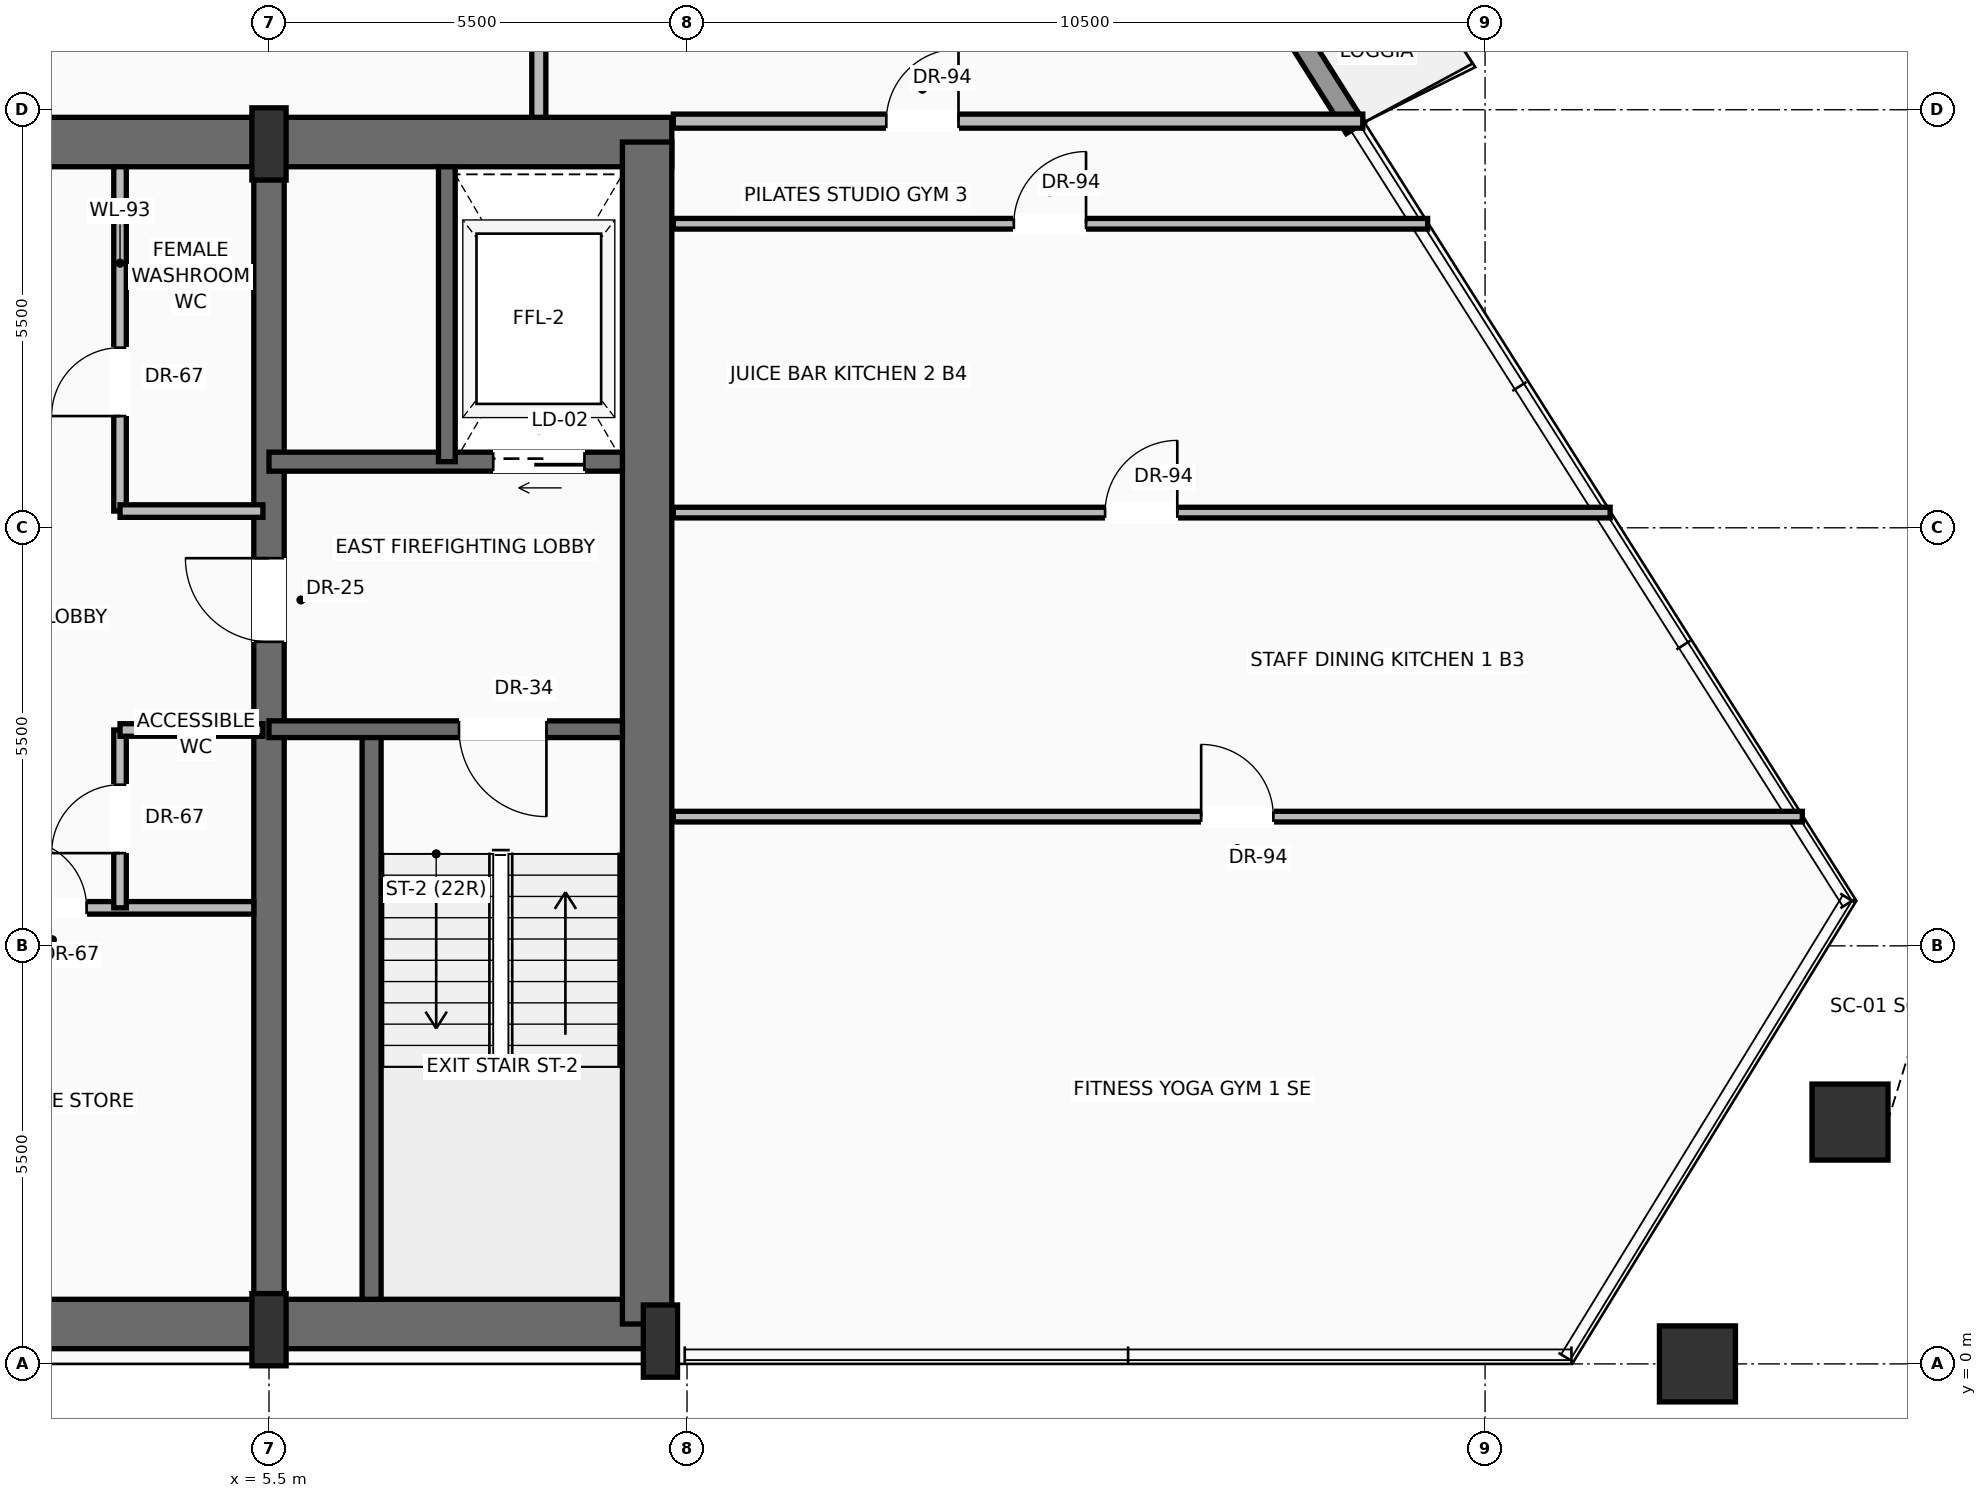
"""IFC4 building model, lengths in metres.
Left out: names, types, materials, properties, quantities, classifications, styles, units other than length and angle.
Written with IfcOpenShell. Run it as: python <this file> out.ifc"""

import sys

from ifc_helpers import new_model, si_unit, direction, frame, frame_2d, origin, origin_2d, place, context, subcontext, project, spatial, rectangle, hollow_rectangle, extrude, source, transform, mapped, element, fill, save


model = new_model("IFC4")
c1 = context("Model", 3, precision=1e-05, world=origin(), true_north=direction((0.0, 1.0)))
c2 = subcontext(c1, "Body", "Model", "MODEL_VIEW")
j1 = project(units=[si_unit("LENGTHUNIT", "METRE"), si_unit("PLANEANGLEUNIT", "RADIAN")], contexts=[c1])
p1 = place(None, origin())
s1 = spatial("IfcSite", under=j1, at=p1, CompositionType="ELEMENT")
p2 = place(p1, origin())
s2 = spatial("IfcBuilding", under=s1, at=p2, CompositionType="ELEMENT")
p3 = place(p2, frame((0.0, 0.0, 196.9)))
s3 = spatial("IfcBuildingStorey", under=s2, at=p3, CompositionType="ELEMENT", Elevation=196.9)
p4 = place(p3, frame((-10.65, 0.525, 0.0), z_axis=(0.0, 0.0, 1.0), x_axis=(1.0, 0.0, 0.0)))
e1 = element("IfcWall", 1, at=p4, inside=s3, PredefinedType="SHEAR", context=c2, shape_type="SweptSolid", body=[
    extrude(rectangle(XDim=21.3, YDim=0.65, at=frame_2d((10.65, 0.0))), origin(), (0.0, 0.0, 1.0), 3.47),
])
p5 = place(p3, frame((-10.8, 16.075, 0.0), z_axis=(0.0, 0.0, 1.0), x_axis=(1.0, 0.0, 0.0)))
e2 = element("IfcWall", 2, at=p5, inside=s3, PredefinedType="SHEAR", context=c2, shape_type="SweptSolid", body=[
    extrude(rectangle(XDim=21.6, YDim=0.65, at=frame_2d((10.8, 0.0))), origin(), (0.0, 0.0, 1.0), 3.47),
])
p6 = place(p5, frame((3.37, 0.0, 0.0)))
e3 = element("IfcOpeningElement", 3, at=p6, cuts=e2, PredefinedType="OPENING", context=c2, shape_type="SweptSolid", body=[
    extrude(rectangle(XDim=1.3, YDim=2.3, at=frame_2d((0.65, 1.15))), frame((0.0, 0.335, 0.0), z_axis=(0.0, -1.0, 0.0), x_axis=(1.0, 0.0, 0.0)), (0.0, 0.0, 1.0), 0.67),
])
p7 = place(p5, frame((9.8, 0.0, 0.0)))
e4 = element("IfcOpeningElement", 4, at=p7, cuts=e2, PredefinedType="OPENING", context=c2, shape_type="SweptSolid", body=[
    extrude(rectangle(XDim=2.0, YDim=2.4, at=frame_2d((1.0, 1.2))), frame((0.0, 0.335, 0.0), z_axis=(0.0, -1.0, 0.0), x_axis=(1.0, 0.0, 0.0)), (0.0, 0.0, 1.0), 0.67),
])
p8 = place(p3, frame((10.475, 0.525, 0.0), z_axis=(0.0, 0.0, 1.0), x_axis=(0.0, 1.0, 0.0)))
e5 = element("IfcWall", 5, at=p8, inside=s3, PredefinedType="SHEAR", context=c2, shape_type="SweptSolid", body=[
    extrude(rectangle(XDim=15.55, YDim=0.65, at=frame_2d((7.775, 0.0))), origin(), (0.0, 0.0, 1.0), 3.47),
])
p9 = place(p3, frame((5.5, 0.525, 0.0), z_axis=(0.0, 0.0, 1.0), x_axis=(0.0, 1.0, 0.0)))
e6 = element("IfcWall", 6, at=p9, inside=s3, PredefinedType="SHEAR", context=c2, shape_type="SweptSolid", body=[
    extrude(rectangle(XDim=15.55, YDim=0.4, at=frame_2d((7.775, 0.0))), origin(), (0.0, 0.0, 1.0), 3.47),
])
p10 = place(p9, frame((8.975, 0.0, 0.0)))
e7 = element("IfcOpeningElement", 7, at=p10, cuts=e6, PredefinedType="OPENING", context=c2, shape_type="SweptSolid", body=[
    extrude(rectangle(XDim=1.1, YDim=2.2, at=frame_2d((0.55, 1.1))), frame((0.0, 0.21, 0.0), z_axis=(0.0, -1.0, 0.0), x_axis=(1.0, 0.0, 0.0)), (0.0, 0.0, 1.0), 0.42),
])
m1 = source(origin(), c2, "Body", "SweptSolid", [
    extrude(rectangle(XDim=0.45, YDim=0.95, at=origin_2d()), origin(), (0.0, 0.0, 1.0), 3.7),
])
for number, where, z_axis, x_axis in (
    (8, (5.5, 0.45, 0.0), (0.0, 0.0, 1.0), (1.0, 0.0, 0.0)),
    (9, (10.65, 0.3, 0.0), (0.0, 0.0, 1.0), (1.0, 0.0, 0.0)),
    (10, (5.5, 16.05, 0.0), (0.0, 0.0, 1.0), (1.0, 0.0, 0.0)),
):
    element("IfcColumn", number, at=place(p3, frame(where, z_axis=z_axis, x_axis=x_axis)), inside=s3, PredefinedType="PILASTER", context=c2, shape_type="MappedRepresentation", body=[
        mapped(m1, transform((0.0, 0.0, 0.0), scale=1.0)),
    ])
m2 = source(origin(), c2, "Body", "SweptSolid", [
    extrude(hollow_rectangle(XDim=1.0, YDim=1.0, WallThickness=0.05, at=origin_2d()), origin(), (0.0, 0.0, 1.0), 3.691),
])
p11 = place(p3, frame((24.294, 0.0, 0.004), z_axis=(0.004563444546, 0.0, 0.999989587433), x_axis=(0.0, 1.0, 0.0)))
e11 = element("IfcColumn", 11, at=p11, inside=s3, PredefinedType="COLUMN", context=c2, shape_type="MappedRepresentation", body=[
    mapped(m2, transform((0.0, 0.0, 0.0), scale=1.0)),
])
m3 = source(origin(), c2, "Body", "SweptSolid", [
    extrude(hollow_rectangle(XDim=1.0, YDim=1.0, WallThickness=0.05, at=origin_2d()), origin(), (0.0, 0.0, 1.0), 3.692),
])
p12 = place(p3, frame((26.302, 3.181, 0.004), z_axis=(-0.006414539113, -0.014482309955, 0.999874550324), x_axis=(0.914327305822, -0.4049760213, 0.0)))
e12 = element("IfcColumn", 12, at=p12, inside=s3, PredefinedType="COLUMN", context=c2, shape_type="MappedRepresentation", body=[
    mapped(m3, transform((0.0, 0.0, 0.0), scale=1.0)),
])
p13 = place(p3, frame((9.62, 32.358, 0.0), z_axis=(0.0, 0.0, 1.0), x_axis=(0.534252973029, -0.845324648174, 0.0)))
e13 = element("IfcWall", 13, at=p13, inside=s3, PredefinedType="SOLIDWALL", context=c2, shape_type="SweptSolid", body=[
    extrude(rectangle(XDim=19.042, YDim=0.28, at=frame_2d((9.521, 0.0))), origin(), (0.0, 0.0, 1.0), 3.05),
])
p14 = place(p13, frame((4.57, 0.0, 0.0)))
e14 = element("IfcOpeningElement", 14, at=p14, cuts=e13, PredefinedType="OPENING", context=c2, shape_type="SweptSolid", body=[
    extrude(rectangle(XDim=1.6, YDim=2.35, at=frame_2d((0.8, 1.175))), frame((0.0, 0.15, 0.0), z_axis=(0.0, -1.0, 0.0), x_axis=(1.0, 0.0, 0.0)), (0.0, 0.0, 1.0), 0.3),
])
p15 = place(p13, frame((12.948, 0.0, 0.9)))
e15 = element("IfcOpeningElement", 15, at=p15, cuts=e13, PredefinedType="OPENING", context=c2, shape_type="SweptSolid", body=[
    extrude(rectangle(XDim=2.0, YDim=1.85, at=frame_2d((1.0, 0.925))), frame((0.0, 0.15, 0.0), z_axis=(0.0, -1.0, 0.0), x_axis=(1.0, 0.0, 0.0)), (0.0, 0.0, 1.0), 0.3),
])
p16 = place(p3, frame((6.85, 0.85, 0.0), z_axis=(0.0, 0.0, 1.0), x_axis=(0.0, 1.0, 0.0)))
e16 = element("IfcWall", 16, at=p16, inside=s3, PredefinedType="SOLIDWALL", context=c2, shape_type="SweptSolid", body=[
    extrude(rectangle(XDim=7.5, YDim=0.25, at=frame_2d((3.75, 0.0))), origin(), (0.0, 0.0, 1.0), 3.47),
])
p17 = place(p3, frame((10.15, 8.35, 0.0), z_axis=(0.0, 0.0, 1.0), x_axis=(-1.0, 0.0, 0.0)))
e17 = element("IfcWall", 17, at=p17, inside=s3, PredefinedType="SOLIDWALL", context=c2, shape_type="SweptSolid", body=[
    extrude(rectangle(XDim=4.65, YDim=0.22, at=frame_2d((2.325, 0.0))), origin(), (0.0, 0.0, 1.0), 3.47),
])
p18 = place(p17, frame((1.0, 0.0, 0.0)))
e18 = element("IfcOpeningElement", 18, at=p18, cuts=e17, PredefinedType="OPENING", context=c2, shape_type="SweptSolid", body=[
    extrude(rectangle(XDim=1.15, YDim=2.2, at=frame_2d((0.575, 1.1))), frame((0.0, 0.12, 0.0), z_axis=(0.0, -1.0, 0.0), x_axis=(1.0, 0.0, 0.0)), (0.0, 0.0, 1.0), 0.24),
])
p19 = place(p3, frame((10.15, 11.87, 0.0), z_axis=(0.0, 0.0, 1.0), x_axis=(-1.0, 0.0, 0.0)))
e19 = element("IfcWall", 19, at=p19, inside=s3, PredefinedType="SOLIDWALL", context=c2, shape_type="SweptSolid", body=[
    extrude(rectangle(XDim=4.65, YDim=0.25, at=frame_2d((2.325, 0.0))), origin(), (0.0, 0.0, 1.0), 3.47),
])
p20 = place(p19, frame((0.5, 0.0, 0.0)))
e20 = element("IfcOpeningElement", 20, at=p20, cuts=e19, PredefinedType="OPENING", context=c2, shape_type="SweptSolid", body=[
    extrude(rectangle(XDim=1.2, YDim=2.25, at=frame_2d((0.6, 1.125))), frame((0.0, 0.135, 0.0), z_axis=(0.0, -1.0, 0.0), x_axis=(1.0, 0.0, 0.0)), (0.0, 0.0, 1.0), 0.27),
])
p21 = place(p3, frame((7.84, 11.87, 0.0), z_axis=(0.0, 0.0, 1.0), x_axis=(0.0, 1.0, 0.0)))
e21 = element("IfcWall", 21, at=p21, inside=s3, PredefinedType="SOLIDWALL", context=c2, shape_type="SweptSolid", body=[
    extrude(rectangle(XDim=3.88, YDim=0.22, at=frame_2d((1.94, 0.0))), origin(), (0.0, 0.0, 1.0), 3.47),
])
p22 = place(p3, frame((1.82, 6.0, 0.0), z_axis=(0.0, 0.0, 1.0), x_axis=(1.0, 0.0, 0.0)))
e22 = element("IfcWall", 22, at=p22, inside=s3, PredefinedType="PARTITIONING", context=c2, shape_type="SweptSolid", body=[
    extrude(rectangle(XDim=3.48, YDim=0.165, at=frame_2d((1.74, 0.0))), origin(), (0.0, 0.0, 1.0), 3.462),
])
p23 = place(p22, frame((0.38, 0.0, 0.0)))
e23 = element("IfcOpeningElement", 23, at=p23, cuts=e22, PredefinedType="OPENING", context=c2, shape_type="SweptSolid", body=[
    extrude(rectangle(XDim=0.9, YDim=2.1, at=frame_2d((0.45, 1.05))), frame((0.0, 0.093, 0.0), z_axis=(0.0, -1.0, 0.0), x_axis=(1.0, 0.0, 0.0)), (0.0, 0.0, 1.0), 0.185),
])
p24 = place(p3, frame((3.54, 6.0, 0.0), z_axis=(0.0, 0.0, 1.0), x_axis=(0.0, 1.0, 0.0)))
e24 = element("IfcWall", 24, at=p24, inside=s3, PredefinedType="PARTITIONING", context=c2, shape_type="SweptSolid", body=[
    extrude(rectangle(XDim=2.34, YDim=0.165, at=frame_2d((1.17, 0.0))), origin(), (0.0, 0.0, 1.0), 3.462),
])
p25 = place(p24, frame((0.72, 0.0, 0.0)))
e25 = element("IfcOpeningElement", 25, at=p25, cuts=e24, PredefinedType="OPENING", context=c2, shape_type="SweptSolid", body=[
    extrude(rectangle(XDim=0.9, YDim=2.1, at=frame_2d((0.45, 1.05))), frame((0.0, 0.093, 0.0), z_axis=(0.0, -1.0, 0.0), x_axis=(1.0, 0.0, 0.0)), (0.0, 0.0, 1.0), 0.185),
])
p26 = place(p3, frame((3.54, 8.34, 0.0), z_axis=(0.0, 0.0, 1.0), x_axis=(1.0, 0.0, 0.0)))
e26 = element("IfcWall", 26, at=p26, inside=s3, PredefinedType="PARTITIONING", context=c2, shape_type="SweptSolid", body=[
    extrude(rectangle(XDim=1.88, YDim=0.165, at=frame_2d((0.94, 0.0))), origin(), (0.0, 0.0, 1.0), 3.462),
])
p27 = place(p3, frame((3.54, 11.22, 0.0), z_axis=(0.0, 0.0, 1.0), x_axis=(0.0, 1.0, 0.0)))
e27 = element("IfcWall", 27, at=p27, inside=s3, PredefinedType="PARTITIONING", context=c2, shape_type="SweptSolid", body=[
    extrude(rectangle(XDim=4.53, YDim=0.165, at=frame_2d((2.265, 0.0))), origin(), (0.0, 0.0, 1.0), 3.462),
])
p28 = place(p27, frame((1.25, 0.0, 0.0)))
e28 = element("IfcOpeningElement", 28, at=p28, cuts=e27, PredefinedType="OPENING", context=c2, shape_type="SweptSolid", body=[
    extrude(rectangle(XDim=0.9, YDim=2.1, at=frame_2d((0.45, 1.05))), frame((0.0, 0.093, 0.0), z_axis=(0.0, -1.0, 0.0), x_axis=(1.0, 0.0, 0.0)), (0.0, 0.0, 1.0), 0.185),
])
p29 = place(p3, frame((3.54, 11.22, 0.0), z_axis=(0.0, 0.0, 1.0), x_axis=(1.0, 0.0, 0.0)))
e29 = element("IfcWall", 29, at=p29, inside=s3, PredefinedType="PARTITIONING", context=c2, shape_type="SweptSolid", body=[
    extrude(rectangle(XDim=1.88, YDim=0.165, at=frame_2d((0.94, 0.0))), origin(), (0.0, 0.0, 1.0), 3.462),
])
p30 = place(p3, frame((9.05, 16.4, 0.0), z_axis=(0.0, 0.0, 1.0), x_axis=(0.0, 1.0, 0.0)))
e30 = element("IfcWall", 30, at=p30, inside=s3, PredefinedType="PARTITIONING", context=c2, shape_type="SweptSolid", body=[
    extrude(rectangle(XDim=5.8, YDim=0.185, at=frame_2d((2.9, 0.0))), origin(), (0.0, 0.0, 1.0), 3.462),
])
p31 = place(p30, frame((1.943, 0.0, 0.0)))
e31 = element("IfcOpeningElement", 31, at=p31, cuts=e30, PredefinedType="OPENING", context=c2, shape_type="SweptSolid", body=[
    extrude(rectangle(XDim=0.95, YDim=2.2, at=frame_2d((0.475, 1.1))), frame((0.0, 0.103, 0.0), z_axis=(0.0, -1.0, 0.0), x_axis=(1.0, 0.0, 0.0)), (0.0, 0.0, 1.0), 0.205),
])
p32 = place(p3, frame((10.82, 16.35, 0.0), z_axis=(0.0, 0.0, 1.0), x_axis=(1.0, 0.0, 0.0)))
e32 = element("IfcWall", 32, at=p32, inside=s3, PredefinedType="PARTITIONING", context=c2, shape_type="SweptSolid", body=[
    extrude(rectangle(XDim=9.071, YDim=0.185, at=frame_2d((4.536, 0.0))), origin(), (0.0, 0.0, 1.0), 3.462),
])
p33 = place(p32, frame((2.802, 0.0, 0.0)))
e33 = element("IfcOpeningElement", 33, at=p33, cuts=e32, PredefinedType="OPENING", context=c2, shape_type="SweptSolid", body=[
    extrude(rectangle(XDim=0.95, YDim=2.2, at=frame_2d((0.475, 1.1))), frame((0.0, 0.103, 0.0), z_axis=(0.0, -1.0, 0.0), x_axis=(1.0, 0.0, 0.0)), (0.0, 0.0, 1.0), 0.205),
])
p34 = place(p3, frame((10.82, 7.2, 0.0), z_axis=(0.0, 0.0, 1.0), x_axis=(1.0, 0.0, 0.0)))
e34 = element("IfcWall", 34, at=p34, inside=s3, PredefinedType="PARTITIONING", context=c2, shape_type="SweptSolid", body=[
    extrude(rectangle(XDim=14.854, YDim=0.14, at=frame_2d((7.427, 0.0))), origin(), (0.0, 0.0, 1.0), 3.049),
])
p35 = place(p34, frame((6.945, 0.0, 0.0)))
e35 = element("IfcOpeningElement", 35, at=p35, cuts=e34, PredefinedType="OPENING", context=c2, shape_type="SweptSolid", body=[
    extrude(rectangle(XDim=0.95, YDim=2.2, at=frame_2d((0.475, 1.1))), frame((0.0, 0.08, 0.0), z_axis=(0.0, -1.0, 0.0), x_axis=(1.0, 0.0, 0.0)), (0.0, 0.0, 1.0), 0.16),
])
p36 = place(p3, frame((10.82, 11.2, 0.0), z_axis=(0.0, 0.0, 1.0), x_axis=(1.0, 0.0, 0.0)))
e36 = element("IfcWall", 36, at=p36, inside=s3, PredefinedType="PARTITIONING", context=c2, shape_type="SweptSolid", body=[
    extrude(rectangle(XDim=12.326, YDim=0.14, at=frame_2d((6.163, 0.0))), origin(), (0.0, 0.0, 1.0), 3.462),
])
p37 = place(p36, frame((5.681, 0.0, 0.0)))
e37 = element("IfcOpeningElement", 37, at=p37, cuts=e36, PredefinedType="OPENING", context=c2, shape_type="SweptSolid", body=[
    extrude(rectangle(XDim=0.95, YDim=2.2, at=frame_2d((0.475, 1.1))), frame((0.0, 0.08, 0.0), z_axis=(0.0, -1.0, 0.0), x_axis=(1.0, 0.0, 0.0)), (0.0, 0.0, 1.0), 0.16),
])
p38 = place(p3, frame((10.82, 15.0, 0.0), z_axis=(0.0, 0.0, 1.0), x_axis=(1.0, 0.0, 0.0)))
e38 = element("IfcWall", 38, at=p38, inside=s3, PredefinedType="PARTITIONING", context=c2, shape_type="SweptSolid", body=[
    extrude(rectangle(XDim=9.924, YDim=0.14, at=frame_2d((4.962, 0.0))), origin(), (0.0, 0.0, 1.0), 3.462),
])
p39 = place(p38, frame((4.48, 0.0, 0.0)))
e39 = element("IfcOpeningElement", 39, at=p39, cuts=e38, PredefinedType="OPENING", context=c2, shape_type="SweptSolid", body=[
    extrude(rectangle(XDim=0.95, YDim=2.2, at=frame_2d((0.475, 1.1))), frame((0.0, 0.08, 0.0), z_axis=(0.0, -1.0, 0.0), x_axis=(1.0, 0.0, 0.0)), (0.0, 0.0, 1.0), 0.16),
])
m4 = source(origin(), c2, "Body", "SweptSolid", [
    extrude(rectangle(XDim=1.15, YDim=2.2, at=frame_2d((0.575, 1.1))), frame((0.0, 0.025, 0.0), z_axis=(0.0, -1.0, 0.0), x_axis=(1.0, 0.0, 0.0)), (0.0, 0.0, 1.0), 0.05),
])
p40 = place(p18, origin())
e40 = element("IfcDoor", 40, at=p40, inside=s3, OperationType="SINGLE_SWING_LEFT", PredefinedType="DOOR", context=c2, shape_type="MappedRepresentation", body=[
    mapped(m4, transform((0.0, 0.0, 0.0), scale=1.0)),
])
fill(e18, e40)
m5 = source(origin(), c2, "Body", "SweptSolid", [
    extrude(rectangle(XDim=1.1, YDim=2.2, at=frame_2d((0.55, 1.1))), frame((0.0, 0.025, 0.0), z_axis=(0.0, -1.0, 0.0), x_axis=(1.0, 0.0, 0.0)), (0.0, 0.0, 1.0), 0.05),
])
p41 = place(p10, origin())
e41 = element("IfcDoor", 41, at=p41, inside=s3, OperationType="SINGLE_SWING_RIGHT", PredefinedType="DOOR", context=c2, shape_type="MappedRepresentation", body=[
    mapped(m5, transform((0.0, 0.0, 0.0), scale=1.0)),
])
fill(e7, e41)
m6 = source(origin(), c2, "Body", "SweptSolid", [
    extrude(rectangle(XDim=1.2, YDim=2.25, at=frame_2d((0.6, 1.125))), frame((0.0, 0.025, 0.0), z_axis=(0.0, -1.0, 0.0), x_axis=(1.0, 0.0, 0.0)), (0.0, 0.0, 1.0), 0.05),
])
p42 = place(p20, origin())
e42 = element("IfcDoor", 42, at=p42, inside=s3, OperationType="SLIDING_TO_RIGHT", PredefinedType="DOOR", context=c2, shape_type="MappedRepresentation", body=[
    mapped(m6, transform((0.0, 0.0, 0.0), scale=1.0)),
])
fill(e20, e42)
m7 = source(origin(), c2, "Body", "SweptSolid", [
    extrude(rectangle(XDim=0.9, YDim=2.1, at=frame_2d((0.45, 1.05))), frame((0.0, 0.025, 0.0), z_axis=(0.0, -1.0, 0.0), x_axis=(1.0, 0.0, 0.0)), (0.0, 0.0, 1.0), 0.05),
])
p43 = place(p23, origin())
e43 = element("IfcDoor", 43, at=p43, inside=s3, OperationType="SINGLE_SWING_LEFT", PredefinedType="DOOR", context=c2, shape_type="MappedRepresentation", body=[
    mapped(m7, transform((0.0, 0.0, 0.0), scale=1.0)),
])
fill(e23, e43)
p44 = place(p25, origin())
e44 = element("IfcDoor", 44, at=p44, inside=s3, OperationType="SINGLE_SWING_LEFT", PredefinedType="DOOR", context=c2, shape_type="MappedRepresentation", body=[
    mapped(m7, transform((0.0, 0.0, 0.0), scale=1.0)),
])
fill(e25, e44)
p45 = place(p28, origin())
e45 = element("IfcDoor", 45, at=p45, inside=s3, OperationType="SINGLE_SWING_LEFT", PredefinedType="DOOR", context=c2, shape_type="MappedRepresentation", body=[
    mapped(m7, transform((0.0, 0.0, 0.0), scale=1.0)),
])
fill(e28, e45)
m8 = source(origin(), c2, "Body", "SweptSolid", [
    extrude(rectangle(XDim=0.95, YDim=2.2, at=frame_2d((0.475, 1.1))), frame((0.0, 0.025, 0.0), z_axis=(0.0, -1.0, 0.0), x_axis=(1.0, 0.0, 0.0)), (0.0, 0.0, 1.0), 0.05),
])
p46 = place(p33, origin())
e46 = element("IfcDoor", 46, at=p46, inside=s3, OperationType="SINGLE_SWING_RIGHT", PredefinedType="DOOR", context=c2, shape_type="MappedRepresentation", body=[
    mapped(m8, transform((0.0, 0.0, 0.0), scale=1.0)),
])
fill(e33, e46)
p47 = place(p39, origin())
e47 = element("IfcDoor", 47, at=p47, inside=s3, OperationType="SINGLE_SWING_RIGHT", PredefinedType="DOOR", context=c2, shape_type="MappedRepresentation", body=[
    mapped(m8, transform((0.0, 0.0, 0.0), scale=1.0)),
])
fill(e39, e47)
p48 = place(p37, origin())
e48 = element("IfcDoor", 48, at=p48, inside=s3, OperationType="SINGLE_SWING_RIGHT", PredefinedType="DOOR", context=c2, shape_type="MappedRepresentation", body=[
    mapped(m8, transform((0.0, 0.0, 0.0), scale=1.0)),
])
fill(e37, e48)
p49 = place(p35, origin())
e49 = element("IfcDoor", 49, at=p49, inside=s3, OperationType="SINGLE_SWING_LEFT", PredefinedType="DOOR", context=c2, shape_type="MappedRepresentation", body=[
    mapped(m8, transform((0.0, 0.0, 0.0), scale=1.0)),
])
fill(e35, e49)
save(model, sys.argv[1])
